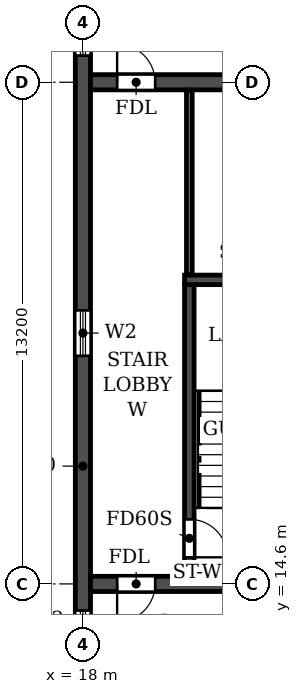
"""IFC4 building model, lengths in metres.
Left out: names, types, materials, properties, quantities, classifications, styles, units other than length and angle.
Written with IfcOpenShell. Run it as: python <this file> out.ifc"""

import sys

from ifc_helpers import new_model, si_unit, direction, frame, frame_2d, origin, place, context, subcontext, project, spatial, rectangle, extrude, element, fill, save


model = new_model("IFC4")
c1 = context("Model", 3, precision=1e-05, world=origin(), true_north=direction((0.0, 1.0)))
c2 = subcontext(c1, "Body", "Model", "MODEL_VIEW")
j1 = project(units=[si_unit("LENGTHUNIT", "METRE"), si_unit("PLANEANGLEUNIT", "RADIAN")], contexts=[c1])
p1 = place(None, origin())
s1 = spatial("IfcSite", under=j1, at=p1, CompositionType="ELEMENT")
p2 = place(p1, origin())
s2 = spatial("IfcBuilding", under=s1, at=p2, CompositionType="ELEMENT")
p3 = place(p2, frame((0.0, 0.0, 211.5)))
s3 = spatial("IfcBuildingStorey", under=s2, at=p3, CompositionType="ELEMENT", Elevation=211.5)
p4 = place(p3, frame((18.0, 4.683, 0.0), z_axis=(0.0, 0.0, 1.0), x_axis=(0.0, 1.0, 0.0)))
e1 = element("IfcWall", 1, at=p4, inside=s3, PredefinedType="SHEAR", context=c2, shape_type="SweptSolid", body=[
    extrude(rectangle(XDim=31.834, YDim=0.4, at=frame_2d((15.917, 0.0))), origin(), (0.0, 0.0, 1.0), 2.95),
])
p5 = place(p4, frame((23.817, 0.0, 0.9)))
e2 = element("IfcOpeningElement", 2, at=p5, cuts=e1, PredefinedType="OPENING", context=c2, shape_type="SweptSolid", body=[
    extrude(rectangle(XDim=1.2, YDim=1.5, at=frame_2d((0.6, 0.75))), frame((0.0, 0.21, 0.0), z_axis=(0.0, -1.0, 0.0), x_axis=(1.0, 0.0, 0.0)), (0.0, 0.0, 1.0), 0.42),
])
p6 = place(p4, frame((8.017, 0.0, 0.9)))
e3 = element("IfcOpeningElement", 3, at=p6, cuts=e1, PredefinedType="OPENING", context=c2, shape_type="SweptSolid", body=[
    extrude(rectangle(XDim=1.2, YDim=1.5, at=frame_2d((0.6, 0.75))), frame((0.0, 0.21, 0.0), z_axis=(0.0, -1.0, 0.0), x_axis=(1.0, 0.0, 0.0)), (0.0, 0.0, 1.0), 0.42),
])
p7 = place(p4, frame((27.694, 0.0, 0.6)))
e4 = element("IfcOpeningElement", 4, at=p7, cuts=e1, PredefinedType="OPENING", context=c2, shape_type="SweptSolid", body=[
    extrude(rectangle(XDim=2.2, YDim=1.8, at=frame_2d((1.1, 0.9))), frame((0.0, 0.21, 0.0), z_axis=(0.0, -1.0, 0.0), x_axis=(1.0, 0.0, 0.0)), (0.0, 0.0, 1.0), 0.42),
])
p8 = place(p4, frame((2.541, 0.0, 0.6)))
e5 = element("IfcOpeningElement", 5, at=p8, cuts=e1, PredefinedType="OPENING", context=c2, shape_type="SweptSolid", body=[
    extrude(rectangle(XDim=2.2, YDim=1.8, at=frame_2d((1.1, 0.9))), frame((0.0, 0.21, 0.0), z_axis=(0.0, -1.0, 0.0), x_axis=(1.0, 0.0, 0.0)), (0.0, 0.0, 1.0), 0.42),
])
p9 = place(p4, frame((15.917, 0.0, 0.9)))
e6 = element("IfcOpeningElement", 6, at=p9, cuts=e1, PredefinedType="OPENING", context=c2, shape_type="SweptSolid", body=[
    extrude(rectangle(XDim=1.2, YDim=1.5, at=frame_2d((0.6, 0.75))), frame((0.0, 0.21, 0.0), z_axis=(0.0, -1.0, 0.0), x_axis=(1.0, 0.0, 0.0)), (0.0, 0.0, 1.0), 0.42),
])
p10 = place(p3, frame((18.2, 14.6, 0.0), z_axis=(0.0, 0.0, 1.0), x_axis=(1.0, 0.0, 0.0)))
e7 = element("IfcWall", 7, at=p10, inside=s3, PredefinedType="SOLIDWALL", context=c2, shape_type="SweptSolid", body=[
    extrude(rectangle(XDim=65.6, YDim=0.4, at=frame_2d((32.8, 0.0))), origin(), (0.0, 0.0, 1.0), 2.95),
])
p11 = place(p10, frame((0.7, 0.0, 0.0)))
e8 = element("IfcOpeningElement", 8, at=p11, cuts=e7, PredefinedType="OPENING", context=c2, shape_type="SweptSolid", body=[
    extrude(rectangle(XDim=1.0, YDim=2.1, at=frame_2d((0.5, 1.05))), frame((0.0, 0.21, 0.0), z_axis=(0.0, -1.0, 0.0), x_axis=(1.0, 0.0, 0.0)), (0.0, 0.0, 1.0), 0.42),
])
p12 = place(p10, frame((8.65, 0.0, 0.0)))
e9 = element("IfcOpeningElement", 9, at=p12, cuts=e7, PredefinedType="OPENING", context=c2, shape_type="SweptSolid", body=[
    extrude(rectangle(XDim=0.9, YDim=2.1, at=frame_2d((0.45, 1.05))), frame((0.0, 0.21, 0.0), z_axis=(0.0, -1.0, 0.0), x_axis=(1.0, 0.0, 0.0)), (0.0, 0.0, 1.0), 0.42),
])
p13 = place(p10, frame((13.2, 0.0, 0.0)))
e10 = element("IfcOpeningElement", 10, at=p13, cuts=e7, PredefinedType="OPENING", context=c2, shape_type="SweptSolid", body=[
    extrude(rectangle(XDim=1.0, YDim=2.1, at=frame_2d((0.5, 1.05))), frame((0.0, 0.21, 0.0), z_axis=(0.0, -1.0, 0.0), x_axis=(1.0, 0.0, 0.0)), (0.0, 0.0, 1.0), 0.42),
])
p14 = place(p10, frame((24.5, 0.0, 0.0)))
e11 = element("IfcOpeningElement", 11, at=p14, cuts=e7, PredefinedType="OPENING", context=c2, shape_type="SweptSolid", body=[
    extrude(rectangle(XDim=1.0, YDim=2.1, at=frame_2d((0.5, 1.05))), frame((0.0, 0.21, 0.0), z_axis=(0.0, -1.0, 0.0), x_axis=(1.0, 0.0, 0.0)), (0.0, 0.0, 1.0), 0.42),
])
p15 = place(p10, frame((28.15, 0.0, 0.0)))
e12 = element("IfcOpeningElement", 12, at=p15, cuts=e7, PredefinedType="OPENING", context=c2, shape_type="SweptSolid", body=[
    extrude(rectangle(XDim=1.5, YDim=2.1, at=frame_2d((0.75, 1.05))), frame((0.0, 0.21, 0.0), z_axis=(0.0, -1.0, 0.0), x_axis=(1.0, 0.0, 0.0)), (0.0, 0.0, 1.0), 0.42),
])
p16 = place(p10, frame((32.3, 0.0, 0.0)))
e13 = element("IfcOpeningElement", 13, at=p16, cuts=e7, PredefinedType="OPENING", context=c2, shape_type="SweptSolid", body=[
    extrude(rectangle(XDim=1.0, YDim=2.1, at=frame_2d((0.5, 1.05))), frame((0.0, 0.21, 0.0), z_axis=(0.0, -1.0, 0.0), x_axis=(1.0, 0.0, 0.0)), (0.0, 0.0, 1.0), 0.42),
])
p17 = place(p10, frame((37.5, 0.0, 0.0)))
e14 = element("IfcOpeningElement", 14, at=p17, cuts=e7, PredefinedType="OPENING", context=c2, shape_type="SweptSolid", body=[
    extrude(rectangle(XDim=1.0, YDim=2.1, at=frame_2d((0.5, 1.05))), frame((0.0, 0.21, 0.0), z_axis=(0.0, -1.0, 0.0), x_axis=(1.0, 0.0, 0.0)), (0.0, 0.0, 1.0), 0.42),
])
p18 = place(p10, frame((51.4, 0.0, 0.0)))
e15 = element("IfcOpeningElement", 15, at=p18, cuts=e7, PredefinedType="OPENING", context=c2, shape_type="SweptSolid", body=[
    extrude(rectangle(XDim=1.0, YDim=2.1, at=frame_2d((0.5, 1.05))), frame((0.0, 0.21, 0.0), z_axis=(0.0, -1.0, 0.0), x_axis=(1.0, 0.0, 0.0)), (0.0, 0.0, 1.0), 0.42),
])
p19 = place(p10, frame((56.05, 0.0, 0.0)))
e16 = element("IfcOpeningElement", 16, at=p19, cuts=e7, PredefinedType="OPENING", context=c2, shape_type="SweptSolid", body=[
    extrude(rectangle(XDim=0.9, YDim=2.1, at=frame_2d((0.45, 1.05))), frame((0.0, 0.21, 0.0), z_axis=(0.0, -1.0, 0.0), x_axis=(1.0, 0.0, 0.0)), (0.0, 0.0, 1.0), 0.42),
])
p20 = place(p10, frame((63.9, 0.0, 0.0)))
e17 = element("IfcOpeningElement", 17, at=p20, cuts=e7, PredefinedType="OPENING", context=c2, shape_type="SweptSolid", body=[
    extrude(rectangle(XDim=1.0, YDim=2.1, at=frame_2d((0.5, 1.05))), frame((0.0, 0.21, 0.0), z_axis=(0.0, -1.0, 0.0), x_axis=(1.0, 0.0, 0.0)), (0.0, 0.0, 1.0), 0.42),
])
p21 = place(p3, frame((18.2, 27.8, 0.0), z_axis=(0.0, 0.0, 1.0), x_axis=(1.0, 0.0, 0.0)))
e18 = element("IfcWall", 18, at=p21, inside=s3, PredefinedType="SOLIDWALL", context=c2, shape_type="SweptSolid", body=[
    extrude(rectangle(XDim=65.6, YDim=0.4, at=frame_2d((32.8, 0.0))), origin(), (0.0, 0.0, 1.0), 2.95),
])
p22 = place(p21, frame((0.7, 0.0, 0.0)))
e19 = element("IfcOpeningElement", 19, at=p22, cuts=e18, PredefinedType="OPENING", context=c2, shape_type="SweptSolid", body=[
    extrude(rectangle(XDim=1.0, YDim=2.1, at=frame_2d((0.5, 1.05))), frame((0.0, 0.21, 0.0), z_axis=(0.0, -1.0, 0.0), x_axis=(1.0, 0.0, 0.0)), (0.0, 0.0, 1.0), 0.42),
])
p23 = place(p21, frame((4.05, 0.0, 0.0)))
e20 = element("IfcOpeningElement", 20, at=p23, cuts=e18, PredefinedType="OPENING", context=c2, shape_type="SweptSolid", body=[
    extrude(rectangle(XDim=0.9, YDim=2.1, at=frame_2d((0.45, 1.05))), frame((0.0, 0.21, 0.0), z_axis=(0.0, -1.0, 0.0), x_axis=(1.0, 0.0, 0.0)), (0.0, 0.0, 1.0), 0.42),
])
p24 = place(p21, frame((8.65, 0.0, 0.0)))
e21 = element("IfcOpeningElement", 21, at=p24, cuts=e18, PredefinedType="OPENING", context=c2, shape_type="SweptSolid", body=[
    extrude(rectangle(XDim=0.9, YDim=2.1, at=frame_2d((0.45, 1.05))), frame((0.0, 0.21, 0.0), z_axis=(0.0, -1.0, 0.0), x_axis=(1.0, 0.0, 0.0)), (0.0, 0.0, 1.0), 0.42),
])
p25 = place(p21, frame((13.25, 0.0, 0.0)))
e22 = element("IfcOpeningElement", 22, at=p25, cuts=e18, PredefinedType="OPENING", context=c2, shape_type="SweptSolid", body=[
    extrude(rectangle(XDim=0.9, YDim=2.1, at=frame_2d((0.45, 1.05))), frame((0.0, 0.21, 0.0), z_axis=(0.0, -1.0, 0.0), x_axis=(1.0, 0.0, 0.0)), (0.0, 0.0, 1.0), 0.42),
])
p26 = place(p21, frame((16.4, 0.0, 0.0)))
e23 = element("IfcOpeningElement", 23, at=p26, cuts=e18, PredefinedType="OPENING", context=c2, shape_type="SweptSolid", body=[
    extrude(rectangle(XDim=1.0, YDim=2.1, at=frame_2d((0.5, 1.05))), frame((0.0, 0.21, 0.0), z_axis=(0.0, -1.0, 0.0), x_axis=(1.0, 0.0, 0.0)), (0.0, 0.0, 1.0), 0.42),
])
p27 = place(p21, frame((21.6, 0.0, 0.0)))
e24 = element("IfcOpeningElement", 24, at=p27, cuts=e18, PredefinedType="OPENING", context=c2, shape_type="SweptSolid", body=[
    extrude(rectangle(XDim=1.0, YDim=2.1, at=frame_2d((0.5, 1.05))), frame((0.0, 0.21, 0.0), z_axis=(0.0, -1.0, 0.0), x_axis=(1.0, 0.0, 0.0)), (0.0, 0.0, 1.0), 0.42),
])
p28 = place(p21, frame((29.4, 0.0, 0.0)))
e25 = element("IfcOpeningElement", 25, at=p28, cuts=e18, PredefinedType="OPENING", context=c2, shape_type="SweptSolid", body=[
    extrude(rectangle(XDim=1.0, YDim=2.1, at=frame_2d((0.5, 1.05))), frame((0.0, 0.21, 0.0), z_axis=(0.0, -1.0, 0.0), x_axis=(1.0, 0.0, 0.0)), (0.0, 0.0, 1.0), 0.42),
])
p29 = place(p21, frame((32.3, 0.0, 0.0)))
e26 = element("IfcOpeningElement", 26, at=p29, cuts=e18, PredefinedType="OPENING", context=c2, shape_type="SweptSolid", body=[
    extrude(rectangle(XDim=1.0, YDim=2.1, at=frame_2d((0.5, 1.05))), frame((0.0, 0.21, 0.0), z_axis=(0.0, -1.0, 0.0), x_axis=(1.0, 0.0, 0.0)), (0.0, 0.0, 1.0), 0.42),
])
p30 = place(p21, frame((36.25, 0.0, 0.0)))
e27 = element("IfcOpeningElement", 27, at=p30, cuts=e18, PredefinedType="OPENING", context=c2, shape_type="SweptSolid", body=[
    extrude(rectangle(XDim=1.5, YDim=2.1, at=frame_2d((0.75, 1.05))), frame((0.0, 0.21, 0.0), z_axis=(0.0, -1.0, 0.0), x_axis=(1.0, 0.0, 0.0)), (0.0, 0.0, 1.0), 0.42),
])
p31 = place(p21, frame((41.7, 0.0, 0.0)))
e28 = element("IfcOpeningElement", 28, at=p31, cuts=e18, PredefinedType="OPENING", context=c2, shape_type="SweptSolid", body=[
    extrude(rectangle(XDim=1.0, YDim=2.1, at=frame_2d((0.5, 1.05))), frame((0.0, 0.21, 0.0), z_axis=(0.0, -1.0, 0.0), x_axis=(1.0, 0.0, 0.0)), (0.0, 0.0, 1.0), 0.42),
])
p32 = place(p21, frame((45.6, 0.0, 0.0)))
e29 = element("IfcOpeningElement", 29, at=p32, cuts=e18, PredefinedType="OPENING", context=c2, shape_type="SweptSolid", body=[
    extrude(rectangle(XDim=1.0, YDim=2.1, at=frame_2d((0.5, 1.05))), frame((0.0, 0.21, 0.0), z_axis=(0.0, -1.0, 0.0), x_axis=(1.0, 0.0, 0.0)), (0.0, 0.0, 1.0), 0.42),
])
p33 = place(p21, frame((48.2, 0.0, 0.0)))
e30 = element("IfcOpeningElement", 30, at=p33, cuts=e18, PredefinedType="OPENING", context=c2, shape_type="SweptSolid", body=[
    extrude(rectangle(XDim=1.0, YDim=2.1, at=frame_2d((0.5, 1.05))), frame((0.0, 0.21, 0.0), z_axis=(0.0, -1.0, 0.0), x_axis=(1.0, 0.0, 0.0)), (0.0, 0.0, 1.0), 0.42),
])
p34 = place(p21, frame((51.45, 0.0, 0.0)))
e31 = element("IfcOpeningElement", 31, at=p34, cuts=e18, PredefinedType="OPENING", context=c2, shape_type="SweptSolid", body=[
    extrude(rectangle(XDim=0.9, YDim=2.1, at=frame_2d((0.45, 1.05))), frame((0.0, 0.21, 0.0), z_axis=(0.0, -1.0, 0.0), x_axis=(1.0, 0.0, 0.0)), (0.0, 0.0, 1.0), 0.42),
])
p35 = place(p21, frame((56.05, 0.0, 0.0)))
e32 = element("IfcOpeningElement", 32, at=p35, cuts=e18, PredefinedType="OPENING", context=c2, shape_type="SweptSolid", body=[
    extrude(rectangle(XDim=0.9, YDim=2.1, at=frame_2d((0.45, 1.05))), frame((0.0, 0.21, 0.0), z_axis=(0.0, -1.0, 0.0), x_axis=(1.0, 0.0, 0.0)), (0.0, 0.0, 1.0), 0.42),
])
p36 = place(p21, frame((60.65, 0.0, 0.0)))
e33 = element("IfcOpeningElement", 33, at=p36, cuts=e18, PredefinedType="OPENING", context=c2, shape_type="SweptSolid", body=[
    extrude(rectangle(XDim=0.9, YDim=2.1, at=frame_2d((0.45, 1.05))), frame((0.0, 0.21, 0.0), z_axis=(0.0, -1.0, 0.0), x_axis=(1.0, 0.0, 0.0)), (0.0, 0.0, 1.0), 0.42),
])
p37 = place(p21, frame((63.9, 0.0, 0.0)))
e34 = element("IfcOpeningElement", 34, at=p37, cuts=e18, PredefinedType="OPENING", context=c2, shape_type="SweptSolid", body=[
    extrude(rectangle(XDim=1.0, YDim=2.1, at=frame_2d((0.5, 1.05))), frame((0.0, 0.21, 0.0), z_axis=(0.0, -1.0, 0.0), x_axis=(1.0, 0.0, 0.0)), (0.0, 0.0, 1.0), 0.42),
])
p38 = place(p3, frame((20.8, 14.8, 0.0), z_axis=(0.0, 0.0, 1.0), x_axis=(0.0, 1.0, 0.0)))
e35 = element("IfcWall", 35, at=p38, inside=s3, PredefinedType="SOLIDWALL", context=c2, shape_type="SweptSolid", body=[
    extrude(rectangle(XDim=7.675, YDim=0.25, at=frame_2d((3.837, 0.0))), origin(), (0.0, 0.0, 1.0), 2.95),
])
p39 = place(p38, frame((0.5, 0.0, 0.0)))
e36 = element("IfcOpeningElement", 36, at=p39, cuts=e35, PredefinedType="OPENING", context=c2, shape_type="SweptSolid", body=[
    extrude(rectangle(XDim=1.0, YDim=2.1, at=frame_2d((0.5, 1.05))), frame((0.0, 0.135, 0.0), z_axis=(0.0, -1.0, 0.0), x_axis=(1.0, 0.0, 0.0)), (0.0, 0.0, 1.0), 0.27),
])
p40 = place(p3, frame((20.675, 22.6, 0.0), z_axis=(0.0, 0.0, 1.0), x_axis=(1.0, 0.0, 0.0)))
e37 = element("IfcWall", 37, at=p40, inside=s3, PredefinedType="SOLIDWALL", context=c2, shape_type="SweptSolid", body=[
    extrude(rectangle(XDim=4.05, YDim=0.25, at=frame_2d((2.025, 0.0))), origin(), (0.0, 0.0, 1.0), 2.95),
])
p41 = place(p3, frame((20.8, 22.735, 0.0), z_axis=(0.0, 0.0, 1.0), x_axis=(0.0, 1.0, 0.0)))
e38 = element("IfcWall", 38, at=p41, inside=s3, PredefinedType="PARTITIONING", context=c2, shape_type="SweptSolid", body=[
    extrude(rectangle(XDim=4.855, YDim=0.15, at=frame_2d((2.427, 0.0))), origin(), (0.0, 0.0, 1.0), 2.95),
])
p42 = place(p5, origin())
e39 = element("IfcWindow", 39, at=p42, inside=s3, PartitioningType="SINGLE_PANEL", PredefinedType="WINDOW", context=c2, shape_type="SweptSolid", body=[
    extrude(rectangle(XDim=1.2, YDim=1.5, at=frame_2d((0.6, 0.75))), frame((0.0, 0.03, 0.0), z_axis=(0.0, -1.0, 0.0), x_axis=(1.0, 0.0, 0.0)), (0.0, 0.0, 1.0), 0.06),
])
fill(e2, e39)
p43 = place(p6, origin())
e40 = element("IfcWindow", 40, at=p43, inside=s3, PartitioningType="SINGLE_PANEL", PredefinedType="WINDOW", context=c2, shape_type="SweptSolid", body=[
    extrude(rectangle(XDim=1.2, YDim=1.5, at=frame_2d((0.6, 0.75))), frame((0.0, 0.03, 0.0), z_axis=(0.0, -1.0, 0.0), x_axis=(1.0, 0.0, 0.0)), (0.0, 0.0, 1.0), 0.06),
])
fill(e3, e40)
p44 = place(p9, origin())
e41 = element("IfcWindow", 41, at=p44, inside=s3, PartitioningType="SINGLE_PANEL", PredefinedType="WINDOW", context=c2, shape_type="SweptSolid", body=[
    extrude(rectangle(XDim=1.2, YDim=1.5, at=frame_2d((0.6, 0.75))), frame((0.0, 0.03, 0.0), z_axis=(0.0, -1.0, 0.0), x_axis=(1.0, 0.0, 0.0)), (0.0, 0.0, 1.0), 0.06),
])
fill(e6, e41)
p45 = place(p22, origin())
e42 = element("IfcDoor", 42, at=p45, inside=s3, OperationType="SINGLE_SWING_LEFT", PredefinedType="DOOR", context=c2, shape_type="SweptSolid", body=[
    extrude(rectangle(XDim=1.0, YDim=2.1, at=frame_2d((0.5, 1.05))), frame((0.0, 0.025, 0.0), z_axis=(0.0, -1.0, 0.0), x_axis=(1.0, 0.0, 0.0)), (0.0, 0.0, 1.0), 0.05),
])
fill(e19, e42)
p46 = place(p11, frame((1.0, 0.0, 0.0), z_axis=(0.0, 0.0, 1.0), x_axis=(-1.0, 0.0, 0.0)))
e43 = element("IfcDoor", 43, at=p46, inside=s3, OperationType="SINGLE_SWING_RIGHT", PredefinedType="DOOR", context=c2, shape_type="SweptSolid", body=[
    extrude(rectangle(XDim=1.0, YDim=2.1, at=frame_2d((0.5, 1.05))), frame((0.0, 0.025, 0.0), z_axis=(0.0, -1.0, 0.0), x_axis=(1.0, 0.0, 0.0)), (0.0, 0.0, 1.0), 0.05),
])
fill(e8, e43)
p47 = place(p39, frame((1.0, 0.0, 0.0), z_axis=(0.0, 0.0, 1.0), x_axis=(-1.0, 0.0, 0.0)))
e44 = element("IfcDoor", 44, at=p47, inside=s3, OperationType="SINGLE_SWING_RIGHT", PredefinedType="DOOR", context=c2, shape_type="SweptSolid", body=[
    extrude(rectangle(XDim=1.0, YDim=2.1, at=frame_2d((0.5, 1.05))), frame((0.0, 0.025, 0.0), z_axis=(0.0, -1.0, 0.0), x_axis=(1.0, 0.0, 0.0)), (0.0, 0.0, 1.0), 0.05),
])
fill(e36, e44)
save(model, sys.argv[1])
